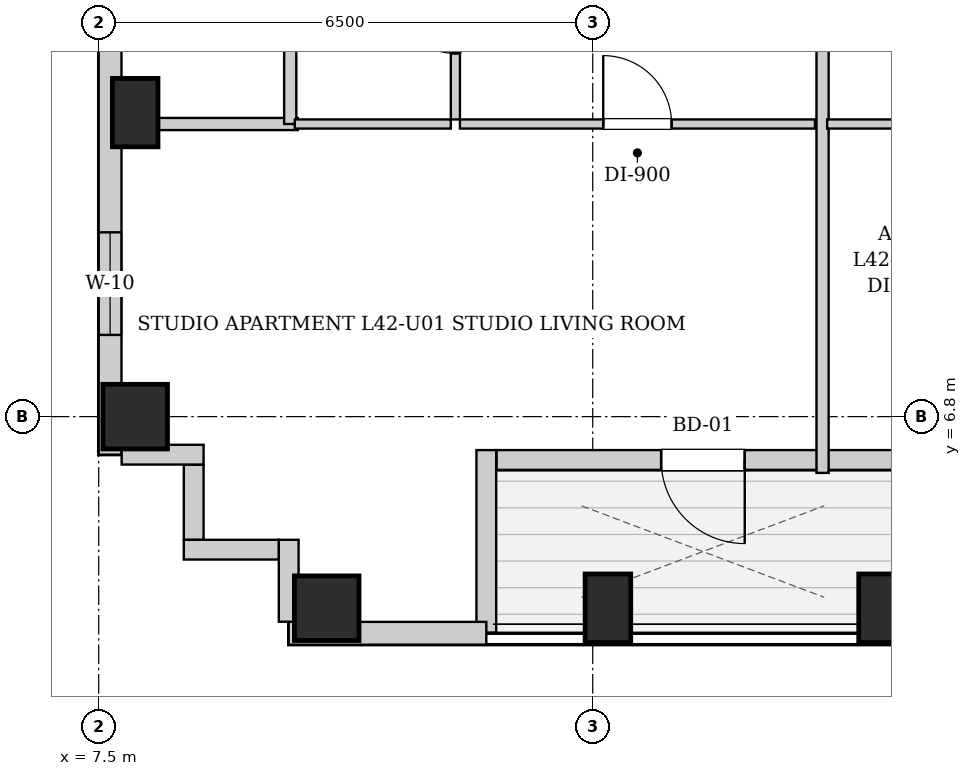
"""IFC4 building model, lengths in metres.
Left out: names, types, materials, properties, quantities, classifications, styles, units other than length and angle.
Written with IfcOpenShell. Run it as: python <this file> out.ifc"""

import sys

from ifc_helpers import new_model, si_unit, direction, frame, frame_2d, origin, origin_2d, place, context, subcontext, project, spatial, rectangle, extrude, element, fill, save


model = new_model("IFC4")
c1 = context("Model", 3, precision=1e-05, world=origin(), true_north=direction((0.0, 1.0)))
c2 = subcontext(c1, "Body", "Model", "MODEL_VIEW")
j1 = project(units=[si_unit("LENGTHUNIT", "METRE"), si_unit("PLANEANGLEUNIT", "RADIAN")], contexts=[c1])
p1 = place(None, origin())
s1 = spatial("IfcSite", under=j1, at=p1, CompositionType="ELEMENT")
p2 = place(p1, origin())
s2 = spatial("IfcBuilding", under=s1, at=p2, CompositionType="ELEMENT")
p3 = place(p2, frame((0.0, 0.0, 147.15)))
s3 = spatial("IfcBuildingStorey", under=s2, at=p3, CompositionType="ELEMENT", Elevation=147.15)
p4 = place(p3, frame((10.5, 4.28, 0.0), z_axis=(0.0, 0.0, 1.0), x_axis=(1.0, 0.0, 0.0)))
e1 = element("IfcColumn", 1, at=p4, inside=s3, PredefinedType="COLUMN", context=c2, shape_type="SweptSolid", body=[
    extrude(rectangle(XDim=0.85, YDim=0.85, at=origin_2d()), origin(), (0.0, 0.0, 1.0), 3.25),
])
for number, where, z_axis, x_axis in (
    (2, (14.2, 4.28, 0.0), (0.0, 0.0, 1.0), (1.0, 0.0, 0.0)),
    (3, (17.8, 4.28, 0.0), (0.0, 0.0, 1.0), (1.0, 0.0, 0.0)),
):
    element("IfcColumn", number, at=place(p3, frame(where, z_axis=z_axis, x_axis=x_axis)), inside=s3, PredefinedType="COLUMN", context=c2, shape_type="SweptSolid", body=[
        extrude(rectangle(XDim=0.6, YDim=0.9, at=origin_2d()), origin(), (0.0, 0.0, 1.0), 3.25),
    ])
p5 = place(p3, frame((7.98, 6.8, 0.0), z_axis=(0.0, 0.0, 1.0), x_axis=(1.0, 0.0, 0.0)))
e4 = element("IfcColumn", 4, at=p5, inside=s3, PredefinedType="COLUMN", context=c2, shape_type="SweptSolid", body=[
    extrude(rectangle(XDim=0.85, YDim=0.85, at=origin_2d()), origin(), (0.0, 0.0, 1.0), 3.25),
])
p6 = place(p3, frame((7.98, 10.8, 0.0), z_axis=(0.0, 0.0, 1.0), x_axis=(1.0, 0.0, 0.0)))
e5 = element("IfcColumn", 5, at=p6, inside=s3, PredefinedType="COLUMN", context=c2, shape_type="SweptSolid", body=[
    extrude(rectangle(XDim=0.6, YDim=0.9, at=origin_2d()), origin(), (0.0, 0.0, 1.0), 3.25),
])
p7 = place(p3, frame((18.166, 6.23, 0.0), z_axis=(0.0, 0.0, 1.0), x_axis=(-1.0, 0.0, 0.0)))
e6 = element("IfcWall", 6, at=p7, inside=s3, PredefinedType="SOLIDWALL", context=c2, shape_type="SweptSolid", body=[
    extrude(rectangle(XDim=5.432, YDim=0.26, at=frame_2d((2.716, 0.0))), origin(), (0.0, 0.0, 1.0), 2.99),
])
p8 = place(p7, frame((2.166, 0.0, 0.0)))
e7 = element("IfcOpeningElement", 7, at=p8, cuts=e6, PredefinedType="OPENING", context=c2, shape_type="SweptSolid", body=[
    extrude(rectangle(XDim=1.1, YDim=2.0, at=frame_2d((0.55, 1.0))), frame((0.0, 0.14, 0.0), z_axis=(0.0, -1.0, 0.0), x_axis=(1.0, 0.0, 0.0)), (0.0, 0.0, 1.0), 0.28),
])
p9 = place(p3, frame((12.6, 6.36, 0.0), z_axis=(0.0, 0.0, 1.0), x_axis=(0.0, -1.0, 0.0)))
e8 = element("IfcWall", 8, at=p9, inside=s3, PredefinedType="SOLIDWALL", context=c2, shape_type="SweptSolid", body=[
    extrude(rectangle(XDim=2.4, YDim=0.26, at=frame_2d((1.2, 0.0))), origin(), (0.0, 0.0, 1.0), 2.99),
])
p10 = place(p3, frame((12.6, 3.95, 0.0), z_axis=(0.0, 0.0, 1.0), x_axis=(-1.0, 0.0, 0.0)))
e9 = element("IfcWall", 9, at=p10, inside=s3, PredefinedType="SOLIDWALL", context=c2, shape_type="SweptSolid", body=[
    extrude(rectangle(XDim=2.6, YDim=0.3, at=frame_2d((1.3, 0.0))), origin(), (0.0, 0.0, 1.0), 2.99),
])
p11 = place(p3, frame((7.65, 6.3, 0.0), z_axis=(0.0, 0.0, 1.0), x_axis=(0.0, 1.0, 0.0)))
e10 = element("IfcWall", 10, at=p11, inside=s3, PredefinedType="SOLIDWALL", context=c2, shape_type="SweptSolid", body=[
    extrude(rectangle(XDim=34.5, YDim=0.3, at=frame_2d((17.25, 0.0))), origin(), (0.0, 0.0, 1.0), 2.99),
])
p12 = place(p11, frame((1.575, 0.0, 0.55)))
e11 = element("IfcOpeningElement", 11, at=p12, cuts=e10, PredefinedType="OPENING", context=c2, shape_type="SweptSolid", body=[
    extrude(rectangle(XDim=1.35, YDim=1.2, at=frame_2d((0.675, 0.6))), frame((0.0, 0.16, 0.0), z_axis=(0.0, -1.0, 0.0), x_axis=(1.0, 0.0, 0.0)), (0.0, 0.0, 1.0), 0.32),
])
p13 = place(p11, frame((30.075, 0.0, 0.55)))
e12 = element("IfcOpeningElement", 12, at=p13, cuts=e10, PredefinedType="OPENING", context=c2, shape_type="SweptSolid", body=[
    extrude(rectangle(XDim=1.35, YDim=1.2, at=frame_2d((0.675, 0.6))), frame((0.0, 0.16, 0.0), z_axis=(0.0, -1.0, 0.0), x_axis=(1.0, 0.0, 0.0)), (0.0, 0.0, 1.0), 0.32),
])
p14 = place(p11, frame((28.31, 0.0, 0.55)))
e13 = element("IfcOpeningElement", 13, at=p14, cuts=e10, PredefinedType="OPENING", context=c2, shape_type="SweptSolid", body=[
    extrude(rectangle(XDim=1.35, YDim=1.2, at=frame_2d((0.675, 0.6))), frame((0.0, 0.16, 0.0), z_axis=(0.0, -1.0, 0.0), x_axis=(1.0, 0.0, 0.0)), (0.0, 0.0, 1.0), 0.32),
])
p15 = place(p11, frame((11.175, 0.0, 0.55)))
e14 = element("IfcOpeningElement", 14, at=p15, cuts=e10, PredefinedType="OPENING", context=c2, shape_type="SweptSolid", body=[
    extrude(rectangle(XDim=1.35, YDim=1.2, at=frame_2d((0.675, 0.6))), frame((0.0, 0.16, 0.0), z_axis=(0.0, -1.0, 0.0), x_axis=(1.0, 0.0, 0.0)), (0.0, 0.0, 1.0), 0.32),
])
p16 = place(p11, frame((9.31, 0.0, 0.55)))
e15 = element("IfcOpeningElement", 15, at=p16, cuts=e10, PredefinedType="OPENING", context=c2, shape_type="SweptSolid", body=[
    extrude(rectangle(XDim=1.35, YDim=1.2, at=frame_2d((0.675, 0.6))), frame((0.0, 0.16, 0.0), z_axis=(0.0, -1.0, 0.0), x_axis=(1.0, 0.0, 0.0)), (0.0, 0.0, 1.0), 0.32),
])
p17 = place(p11, frame((18.2, 0.0, 0.55)))
e16 = element("IfcOpeningElement", 16, at=p17, cuts=e10, PredefinedType="OPENING", context=c2, shape_type="SweptSolid", body=[
    extrude(rectangle(XDim=1.35, YDim=1.2, at=frame_2d((0.675, 0.6))), frame((0.0, 0.16, 0.0), z_axis=(0.0, -1.0, 0.0), x_axis=(1.0, 0.0, 0.0)), (0.0, 0.0, 1.0), 0.32),
])
p18 = place(p11, frame((19.81, 0.0, 0.55)))
e17 = element("IfcOpeningElement", 17, at=p18, cuts=e10, PredefinedType="OPENING", context=c2, shape_type="SweptSolid", body=[
    extrude(rectangle(XDim=1.35, YDim=1.2, at=frame_2d((0.675, 0.6))), frame((0.0, 0.16, 0.0), z_axis=(0.0, -1.0, 0.0), x_axis=(1.0, 0.0, 0.0)), (0.0, 0.0, 1.0), 0.32),
])
p19 = place(p3, frame((10.0, 4.102, 0.0), z_axis=(0.0, 0.0, 1.0), x_axis=(0.0, 1.0, 0.0)))
e18 = element("IfcWall", 18, at=p19, inside=s3, PredefinedType="SOLIDWALL", context=c2, shape_type="SweptSolid", body=[
    extrude(rectangle(XDim=1.078, YDim=0.26, at=frame_2d((0.539, 0.0))), origin(), (0.0, 0.0, 1.0), 2.99),
])
p20 = place(p3, frame((9.868, 5.05, 0.0), z_axis=(0.0, 0.0, 1.0), x_axis=(-1.0, 0.0, 0.0)))
e19 = element("IfcWall", 19, at=p20, inside=s3, PredefinedType="SOLIDWALL", context=c2, shape_type="SweptSolid", body=[
    extrude(rectangle(XDim=1.248, YDim=0.26, at=frame_2d((0.624, 0.0))), origin(), (0.0, 0.0, 1.0), 2.99),
])
p21 = place(p3, frame((8.75, 5.182, 0.0), z_axis=(0.0, 0.0, 1.0), x_axis=(0.0, 1.0, 0.0)))
e20 = element("IfcWall", 20, at=p21, inside=s3, PredefinedType="SOLIDWALL", context=c2, shape_type="SweptSolid", body=[
    extrude(rectangle(XDim=0.986, YDim=0.26, at=frame_2d((0.493, 0.0))), origin(), (0.0, 0.0, 1.0), 2.99),
])
p22 = place(p3, frame((8.88, 6.3, 0.0), z_axis=(0.0, 0.0, 1.0), x_axis=(-1.0, 0.0, 0.0)))
e21 = element("IfcWall", 21, at=p22, inside=s3, PredefinedType="SOLIDWALL", context=c2, shape_type="SweptSolid", body=[
    extrude(rectangle(XDim=1.078, YDim=0.26, at=frame_2d((0.539, 0.0))), origin(), (0.0, 0.0, 1.0), 2.99),
])
p23 = place(p3, frame((7.78, 10.65, 0.0), z_axis=(0.0, 0.0, 1.0), x_axis=(1.0, 0.0, 0.0)))
e22 = element("IfcWall", 22, at=p23, inside=s3, PredefinedType="PARTITIONING", context=c2, shape_type="SweptSolid", body=[
    extrude(rectangle(XDim=2.34, YDim=0.16, at=frame_2d((1.17, 0.0))), origin(), (0.0, 0.0, 1.0), 2.99),
])
p24 = place(p3, frame((10.02, 10.65, 0.0), z_axis=(0.0, 0.0, 1.0), x_axis=(0.0, 1.0, 0.0)))
e23 = element("IfcWall", 23, at=p24, inside=s3, PredefinedType="PARTITIONING", context=c2, shape_type="SweptSolid", body=[
    extrude(rectangle(XDim=2.66, YDim=0.16, at=frame_2d((1.33, 0.0))), origin(), (0.0, 0.0, 1.0), 2.99),
])
p25 = place(p3, frame((12.193, 10.71, 0.0), z_axis=(0.0, 0.0, 1.0), x_axis=(0.0, 1.0, 0.0)))
e24 = element("IfcWall", 24, at=p25, inside=s3, PredefinedType="PARTITIONING", context=c2, shape_type="SweptSolid", body=[
    extrude(rectangle(XDim=2.6, YDim=0.12, at=frame_2d((1.3, 0.0))), origin(), (0.0, 0.0, 1.0), 2.99),
])
p26 = place(p25, frame((0.87, 0.0, 0.0)))
e25 = element("IfcOpeningElement", 25, at=p26, cuts=e24, PredefinedType="OPENING", context=c2, shape_type="SweptSolid", body=[
    extrude(rectangle(XDim=0.86, YDim=2.05, at=frame_2d((0.43, 1.025))), frame((0.0, 0.07, 0.0), z_axis=(0.0, -1.0, 0.0), x_axis=(1.0, 0.0, 0.0)), (0.0, 0.0, 1.0), 0.14),
])
p27 = place(p3, frame((10.08, 10.65, 0.0), z_axis=(0.0, 0.0, 1.0), x_axis=(1.0, 0.0, 0.0)))
e26 = element("IfcWall", 26, at=p27, inside=s3, PredefinedType="PARTITIONING", context=c2, shape_type="SweptSolid", body=[
    extrude(rectangle(XDim=2.053, YDim=0.12, at=frame_2d((1.026, 0.0))), origin(), (0.0, 0.0, 1.0), 2.99),
])
p28 = place(p3, frame((12.253, 10.65, 0.0), z_axis=(0.0, 0.0, 1.0), x_axis=(1.0, 0.0, 0.0)))
e27 = element("IfcWall", 27, at=p28, inside=s3, PredefinedType="PARTITIONING", context=c2, shape_type="SweptSolid", body=[
    extrude(rectangle(XDim=4.671, YDim=0.12, at=frame_2d((2.335, 0.0))), origin(), (0.0, 0.0, 1.0), 2.99),
])
p29 = place(p28, frame((1.885, 0.0, 0.0)))
e28 = element("IfcOpeningElement", 28, at=p29, cuts=e27, PredefinedType="OPENING", context=c2, shape_type="SweptSolid", body=[
    extrude(rectangle(XDim=0.9, YDim=2.05, at=frame_2d((0.45, 1.025))), frame((0.0, 0.07, 0.0), z_axis=(0.0, -1.0, 0.0), x_axis=(1.0, 0.0, 0.0)), (0.0, 0.0, 1.0), 0.14),
])
p30 = place(p3, frame((17.024, 6.06, 0.0), z_axis=(0.0, 0.0, 1.0), x_axis=(0.0, 1.0, 0.0)))
e29 = element("IfcWall", 29, at=p30, inside=s3, PredefinedType="PARTITIONING", context=c2, shape_type="SweptSolid", body=[
    extrude(rectangle(XDim=7.25, YDim=0.16, at=frame_2d((3.625, 0.0))), origin(), (0.0, 0.0, 1.0), 2.99),
])
p31 = place(p3, frame((17.084, 10.65, 0.0), z_axis=(0.0, 0.0, 1.0), x_axis=(1.0, 0.0, 0.0)))
e30 = element("IfcWall", 30, at=p31, inside=s3, PredefinedType="PARTITIONING", context=c2, shape_type="SweptSolid", body=[
    extrude(rectangle(XDim=2.4, YDim=0.12, at=frame_2d((1.2, 0.0))), origin(), (0.0, 0.0, 1.0), 2.99),
])
p32 = place(p26, origin())
e31 = element("IfcDoor", 31, at=p32, inside=s3, OperationType="SINGLE_SWING_RIGHT", PredefinedType="DOOR", context=c2, shape_type="SweptSolid", body=[
    extrude(rectangle(XDim=0.86, YDim=2.05, at=frame_2d((0.43, 1.025))), frame((0.0, 0.025, 0.0), z_axis=(0.0, -1.0, 0.0), x_axis=(1.0, 0.0, 0.0)), (0.0, 0.0, 1.0), 0.05),
])
fill(e25, e31)
p33 = place(p29, origin())
e32 = element("IfcDoor", 32, at=p33, inside=s3, OperationType="SINGLE_SWING_LEFT", PredefinedType="DOOR", context=c2, shape_type="SweptSolid", body=[
    extrude(rectangle(XDim=0.9, YDim=2.05, at=frame_2d((0.45, 1.025))), frame((0.0, 0.025, 0.0), z_axis=(0.0, -1.0, 0.0), x_axis=(1.0, 0.0, 0.0)), (0.0, 0.0, 1.0), 0.05),
])
fill(e28, e32)
p34 = place(p8, origin())
e33 = element("IfcDoor", 33, at=p34, inside=s3, OperationType="SINGLE_SWING_LEFT", PredefinedType="DOOR", context=c2, shape_type="SweptSolid", body=[
    extrude(rectangle(XDim=1.1, YDim=2.0, at=frame_2d((0.55, 1.0))), frame((0.0, 0.025, 0.0), z_axis=(0.0, -1.0, 0.0), x_axis=(1.0, 0.0, 0.0)), (0.0, 0.0, 1.0), 0.05),
])
fill(e7, e33)
p35 = place(p12, origin())
e34 = element("IfcWindow", 34, at=p35, inside=s3, PartitioningType="SINGLE_PANEL", PredefinedType="WINDOW", context=c2, shape_type="SweptSolid", body=[
    extrude(rectangle(XDim=1.35, YDim=1.2, at=frame_2d((0.675, 0.6))), frame((0.0, 0.03, 0.0), z_axis=(0.0, -1.0, 0.0), x_axis=(1.0, 0.0, 0.0)), (0.0, 0.0, 1.0), 0.06),
])
fill(e11, e34)
save(model, sys.argv[1])
